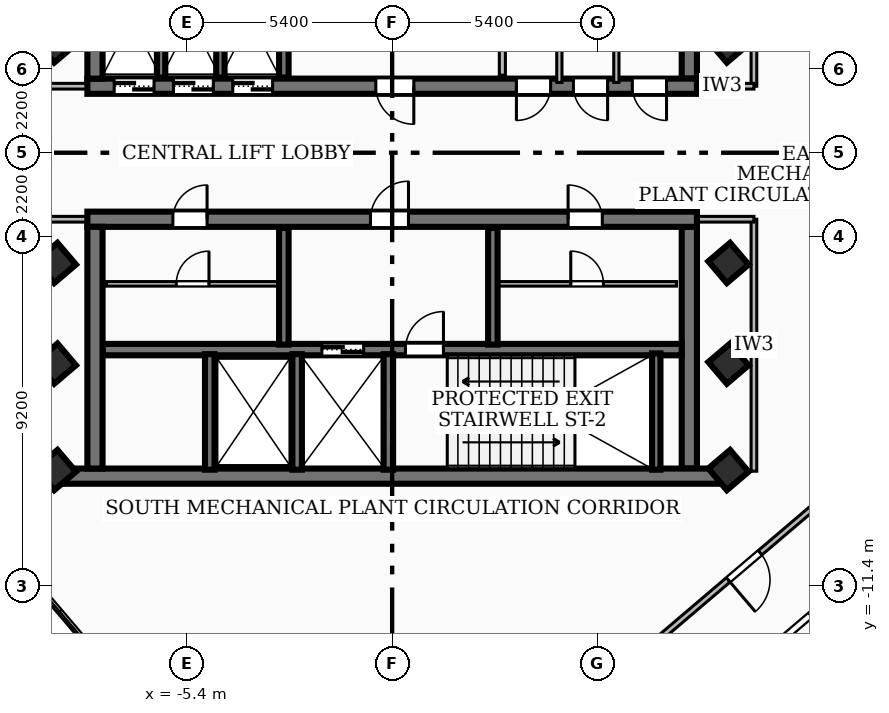
"""IFC4 building model, lengths in metres.
Left out: names, types, materials, properties, quantities, classifications, styles, units other than length and angle.
Written with IfcOpenShell. Run it as: python <this file> out.ifc"""

import sys

from ifc_helpers import new_model, si_unit, direction, frame, frame_2d, origin, origin_2d, place, context, subcontext, project, spatial, rectangle, extrude, element, fill, save


model = new_model("IFC4")
c1 = context("Model", 3, precision=1e-05, world=origin(), true_north=direction((0.0, 1.0)))
c2 = subcontext(c1, "Body", "Model", "MODEL_VIEW")
j1 = project(units=[si_unit("LENGTHUNIT", "METRE"), si_unit("PLANEANGLEUNIT", "RADIAN")], contexts=[c1])
p1 = place(None, origin())
s1 = spatial("IfcSite", under=j1, at=p1, CompositionType="ELEMENT")
p2 = place(p1, origin())
s2 = spatial("IfcBuilding", under=s1, at=p2, CompositionType="ELEMENT")
p3 = place(p2, frame((0.0, 0.0, 239.4)))
s3 = spatial("IfcBuildingStorey", under=s2, at=p3, CompositionType="ELEMENT", Elevation=239.4)
p4 = place(p3, frame((8.02, 1.75, 0.0), z_axis=(0.0, 0.0, 1.0), x_axis=(-1.0, 0.0, 0.0)))
e1 = element("IfcWall", 1, at=p4, inside=s3, PredefinedType="SHEAR", context=c2, shape_type="SweptSolid", body=[
    extrude(rectangle(XDim=16.04, YDim=0.4, at=frame_2d((8.02, 0.0))), origin(), (0.0, 0.0, 1.0), 4.42),
])
p5 = place(p4, frame((7.45, 0.0, 0.0)))
e2 = element("IfcOpeningElement", 2, at=p5, cuts=e1, PredefinedType="OPENING", context=c2, shape_type="SweptSolid", body=[
    extrude(rectangle(XDim=1.0, YDim=2.1, at=frame_2d((0.5, 1.05))), frame((0.0, 0.21, 0.0), z_axis=(0.0, -1.0, 0.0), x_axis=(1.0, 0.0, 0.0)), (0.0, 0.0, 1.0), 0.42),
])
p6 = place(p4, frame((14.285, 0.0, 0.0)))
e3 = element("IfcOpeningElement", 3, at=p6, cuts=e1, PredefinedType="OPENING", context=c2, shape_type="SweptSolid", body=[
    extrude(rectangle(XDim=1.05, YDim=2.15, at=frame_2d((0.525, 1.075))), frame((0.0, 0.21, 0.0), z_axis=(0.0, -1.0, 0.0), x_axis=(1.0, 0.0, 0.0)), (0.0, 0.0, 1.0), 0.42),
])
p7 = place(p4, frame((12.725, 0.0, 0.0)))
e4 = element("IfcOpeningElement", 4, at=p7, cuts=e1, PredefinedType="OPENING", context=c2, shape_type="SweptSolid", body=[
    extrude(rectangle(XDim=1.05, YDim=2.15, at=frame_2d((0.525, 1.075))), frame((0.0, 0.21, 0.0), z_axis=(0.0, -1.0, 0.0), x_axis=(1.0, 0.0, 0.0)), (0.0, 0.0, 1.0), 0.42),
])
p8 = place(p4, frame((11.165, 0.0, 0.0)))
e5 = element("IfcOpeningElement", 5, at=p8, cuts=e1, PredefinedType="OPENING", context=c2, shape_type="SweptSolid", body=[
    extrude(rectangle(XDim=1.05, YDim=2.15, at=frame_2d((0.525, 1.075))), frame((0.0, 0.21, 0.0), z_axis=(0.0, -1.0, 0.0), x_axis=(1.0, 0.0, 0.0)), (0.0, 0.0, 1.0), 0.42),
])
p9 = place(p4, frame((3.85, 0.0, 0.0)))
e6 = element("IfcOpeningElement", 6, at=p9, cuts=e1, PredefinedType="OPENING", context=c2, shape_type="SweptSolid", body=[
    extrude(rectangle(XDim=0.9, YDim=2.06, at=frame_2d((0.45, 1.03))), frame((0.0, 0.21, 0.0), z_axis=(0.0, -1.0, 0.0), x_axis=(1.0, 0.0, 0.0)), (0.0, 0.0, 1.0), 0.42),
])
p10 = place(p4, frame((2.35, 0.0, 0.0)))
e7 = element("IfcOpeningElement", 7, at=p10, cuts=e1, PredefinedType="OPENING", context=c2, shape_type="SweptSolid", body=[
    extrude(rectangle(XDim=0.9, YDim=2.06, at=frame_2d((0.45, 1.03))), frame((0.0, 0.21, 0.0), z_axis=(0.0, -1.0, 0.0), x_axis=(1.0, 0.0, 0.0)), (0.0, 0.0, 1.0), 0.42),
])
p11 = place(p4, frame((0.8, 0.0, 0.0)))
e8 = element("IfcOpeningElement", 8, at=p11, cuts=e1, PredefinedType="OPENING", context=c2, shape_type="SweptSolid", body=[
    extrude(rectangle(XDim=0.9, YDim=2.06, at=frame_2d((0.45, 1.03))), frame((0.0, 0.21, 0.0), z_axis=(0.0, -1.0, 0.0), x_axis=(1.0, 0.0, 0.0)), (0.0, 0.0, 1.0), 0.42),
])
for number, where, z_axis, x_axis in (
    (9, (-7.82, 1.95, 0.0), (0.0, 0.0, 1.0), (0.0, 1.0, 0.0)),
    (10, (7.82, 8.31, 0.0), (0.0, 0.0, 1.0), (0.0, -1.0, 0.0)),
):
    element("IfcWall", number, at=place(p3, frame(where, z_axis=z_axis, x_axis=x_axis)), inside=s3, PredefinedType="SHEAR", context=c2, shape_type="SweptSolid", body=[
        extrude(rectangle(XDim=6.36, YDim=0.4, at=frame_2d((3.18, 0.0))), origin(), (0.0, 0.0, 1.0), 4.42),
    ])
p12 = place(p3, frame((8.78, -8.51, 0.0), z_axis=(0.0, 0.0, 1.0), x_axis=(-1.0, 0.0, 0.0)))
e11 = element("IfcWall", 11, at=p12, inside=s3, PredefinedType="SHEAR", context=c2, shape_type="SweptSolid", body=[
    extrude(rectangle(XDim=17.56, YDim=0.4, at=frame_2d((8.78, 0.0))), origin(), (0.0, 0.0, 1.0), 4.42),
])
p13 = place(p3, frame((-8.02, -1.75, 0.0), z_axis=(0.0, 0.0, 1.0), x_axis=(1.0, 0.0, 0.0)))
e12 = element("IfcWall", 12, at=p13, inside=s3, PredefinedType="SHEAR", context=c2, shape_type="SweptSolid", body=[
    extrude(rectangle(XDim=16.04, YDim=0.4, at=frame_2d((8.02, 0.0))), origin(), (0.0, 0.0, 1.0), 4.42),
])
p14 = place(p13, frame((7.45, 0.0, 0.0)))
e13 = element("IfcOpeningElement", 13, at=p14, cuts=e12, PredefinedType="OPENING", context=c2, shape_type="SweptSolid", body=[
    extrude(rectangle(XDim=1.0, YDim=2.1, at=frame_2d((0.5, 1.05))), frame((0.0, 0.21, 0.0), z_axis=(0.0, -1.0, 0.0), x_axis=(1.0, 0.0, 0.0)), (0.0, 0.0, 1.0), 0.42),
])
p15 = place(p13, frame((12.65, 0.0, 0.0)))
e14 = element("IfcOpeningElement", 14, at=p15, cuts=e12, PredefinedType="OPENING", context=c2, shape_type="SweptSolid", body=[
    extrude(rectangle(XDim=0.9, YDim=2.06, at=frame_2d((0.45, 1.03))), frame((0.0, 0.21, 0.0), z_axis=(0.0, -1.0, 0.0), x_axis=(1.0, 0.0, 0.0)), (0.0, 0.0, 1.0), 0.42),
])
p16 = place(p13, frame((2.25, 0.0, 0.0)))
e15 = element("IfcOpeningElement", 15, at=p16, cuts=e12, PredefinedType="OPENING", context=c2, shape_type="SweptSolid", body=[
    extrude(rectangle(XDim=0.9, YDim=2.06, at=frame_2d((0.45, 1.03))), frame((0.0, 0.21, 0.0), z_axis=(0.0, -1.0, 0.0), x_axis=(1.0, 0.0, 0.0)), (0.0, 0.0, 1.0), 0.42),
])
for number, where, z_axis, x_axis in (
    (16, (-7.82, -8.31, 0.0), (0.0, 0.0, 1.0), (0.0, 1.0, 0.0)),
    (17, (7.82, -1.95, 0.0), (0.0, 0.0, 1.0), (0.0, -1.0, 0.0)),
):
    element("IfcWall", number, at=place(p3, frame(where, z_axis=z_axis, x_axis=x_axis)), inside=s3, PredefinedType="SHEAR", context=c2, shape_type="SweptSolid", body=[
        extrude(rectangle(XDim=6.36, YDim=0.4, at=frame_2d((3.18, 0.0))), origin(), (0.0, 0.0, 1.0), 4.42),
    ])
p17 = place(p3, frame((-7.62, -5.18, 0.0), z_axis=(0.0, 0.0, 1.0), x_axis=(1.0, 0.0, 0.0)))
e18 = element("IfcWall", 18, at=p17, inside=s3, PredefinedType="SOLIDWALL", context=c2, shape_type="SweptSolid", body=[
    extrude(rectangle(XDim=15.24, YDim=0.3, at=frame_2d((7.62, 0.0))), origin(), (0.0, 0.0, 1.0), 4.42),
])
p18 = place(p17, frame((5.77, 0.0, 0.0)))
e19 = element("IfcOpeningElement", 19, at=p18, cuts=e18, PredefinedType="OPENING", context=c2, shape_type="SweptSolid", body=[
    extrude(rectangle(XDim=1.1, YDim=2.15, at=frame_2d((0.55, 1.075))), frame((0.0, 0.16, 0.0), z_axis=(0.0, -1.0, 0.0), x_axis=(1.0, 0.0, 0.0)), (0.0, 0.0, 1.0), 0.32),
])
p19 = place(p17, frame((7.97, 0.0, 0.0)))
e20 = element("IfcOpeningElement", 20, at=p19, cuts=e18, PredefinedType="OPENING", context=c2, shape_type="SweptSolid", body=[
    extrude(rectangle(XDim=1.0, YDim=2.1, at=frame_2d((0.5, 1.05))), frame((0.0, 0.16, 0.0), z_axis=(0.0, -1.0, 0.0), x_axis=(1.0, 0.0, 0.0)), (0.0, 0.0, 1.0), 0.32),
])
p20 = place(p3, frame((6.95, -8.34, 0.0), z_axis=(0.0, 0.0, 1.0), x_axis=(0.0, 1.0, 0.0)))
e21 = element("IfcWall", 21, at=p20, inside=s3, PredefinedType="SOLIDWALL", context=c2, shape_type="SweptSolid", body=[
    extrude(rectangle(XDim=3.06, YDim=0.22, at=frame_2d((1.53, 0.0))), origin(), (0.0, 0.0, 1.0), 4.42),
])
p21 = place(p3, frame((-2.85, 1.98, 0.0), z_axis=(0.0, 0.0, 1.0), x_axis=(0.0, 1.0, 0.0)))
e22 = element("IfcWall", 22, at=p21, inside=s3, PredefinedType="SOLIDWALL", context=c2, shape_type="SweptSolid", body=[
    extrude(rectangle(XDim=3.07, YDim=0.25, at=frame_2d((1.535, 0.0))), origin(), (0.0, 0.0, 1.0), 4.42),
])
for number, where, z_axis, x_axis in (
    (23, (-0.1, -8.34, 0.0), (0.0, 0.0, 1.0), (0.0, 1.0, 0.0)),
    (24, (-2.5, -8.34, 0.0), (0.0, 0.0, 1.0), (0.0, 1.0, 0.0)),
    (25, (-4.8, -8.34, 0.0), (0.0, 0.0, 1.0), (0.0, 1.0, 0.0)),
):
    element("IfcWall", number, at=place(p3, frame(where, z_axis=z_axis, x_axis=x_axis)), inside=s3, PredefinedType="SOLIDWALL", context=c2, shape_type="SweptSolid", body=[
        extrude(rectangle(XDim=3.04, YDim=0.25, at=frame_2d((1.52, 0.0))), origin(), (0.0, 0.0, 1.0), 4.42),
    ])
for number, where, z_axis, x_axis in (
    (26, (-2.85, -5.05, 0.0), (0.0, 0.0, 1.0), (0.0, 1.0, 0.0)),
    (27, (2.65, -5.05, 0.0), (0.0, 0.0, 1.0), (0.0, 1.0, 0.0)),
):
    element("IfcWall", number, at=place(p3, frame(where, z_axis=z_axis, x_axis=x_axis)), inside=s3, PredefinedType="SOLIDWALL", context=c2, shape_type="SweptSolid", body=[
        extrude(rectangle(XDim=3.07, YDim=0.25, at=frame_2d((1.535, 0.0))), origin(), (0.0, 0.0, 1.0), 4.42),
    ])
for number, where, z_axis, x_axis in (
    (28, (-6.08, 1.98, 0.0), (0.0, 0.0, 1.0), (0.0, 1.0, 0.0)),
    (29, (-4.52, 1.98, 0.0), (0.0, 0.0, 1.0), (0.0, 1.0, 0.0)),
):
    element("IfcWall", number, at=place(p3, frame(where, z_axis=z_axis, x_axis=x_axis)), inside=s3, PredefinedType="SOLIDWALL", context=c2, shape_type="SweptSolid", body=[
        extrude(rectangle(XDim=3.07, YDim=0.22, at=frame_2d((1.535, 0.0))), origin(), (0.0, 0.0, 1.0), 4.42),
    ])
for number, where, z_axis, x_axis in (
    (30, (-8.85, -5.55, 0.0), (0.0, 0.0, 1.0), (0.762, 0.648, 0.0)),
    (31, (-8.85, -2.9, 0.0), (0.0, 0.0, 1.0), (0.762, 0.648, 0.0)),
    (32, (-8.85, 2.9, 0.0), (0.0, 0.0, 1.0), (0.762, 0.648, 0.0)),
    (33, (8.85, -5.55, 0.0), (0.0, 0.0, 1.0), (0.762, 0.648, 0.0)),
    (34, (8.85, -2.9, 0.0), (0.0, 0.0, 1.0), (0.762, 0.648, 0.0)),
    (35, (8.85, 2.9, 0.0), (0.0, 0.0, 1.0), (0.762, 0.648, 0.0)),
    (36, (8.85, -8.35, 0.0), (0.0, 0.0, 1.0), (0.762, 0.648, 0.0)),
    (37, (-8.85, -8.35, 0.0), (0.0, 0.0, 1.0), (0.762, 0.648, 0.0)),
):
    element("IfcColumn", number, at=place(p3, frame(where, z_axis=z_axis, x_axis=x_axis)), inside=s3, PredefinedType="COLUMN", context=c2, shape_type="SweptSolid", body=[
        extrude(rectangle(XDim=0.75, YDim=0.75, at=origin_2d()), origin(), (0.0, 0.0, 1.0), 4.68),
    ])
p22 = place(p3, frame((16.951, -12.493, 0.0), z_axis=(0.0, 0.0, 1.0), x_axis=(-0.761554435907, -0.648100949814, 0.0)))
e38 = element("IfcWall", 38, at=p22, inside=s3, PredefinedType="SOLIDWALL", context=c2, shape_type="SweptSolid", body=[
    extrude(rectangle(XDim=10.224, YDim=0.2, at=frame_2d((5.112, 0.0))), origin(), (0.0, 0.0, 1.0), 4.42),
])
p23 = place(p3, frame((2.9, 2.04, 0.0), z_axis=(0.0, 0.0, 1.0), x_axis=(0.0, 1.0, 0.0)))
e39 = element("IfcWall", 39, at=p23, inside=s3, PredefinedType="PARTITIONING", context=c2, shape_type="SweptSolid", body=[
    extrude(rectangle(XDim=2.94, YDim=0.16, at=frame_2d((1.47, 0.0))), origin(), (0.0, 0.0, 1.0), 3.65),
])
p24 = place(p23, frame((1.82, 0.0, 0.0)))
e40 = element("IfcOpeningElement", 40, at=p24, cuts=e39, PredefinedType="OPENING", context=c2, shape_type="SweptSolid", body=[
    extrude(rectangle(XDim=0.9, YDim=2.06, at=frame_2d((0.45, 1.03))), frame((0.0, 0.09, 0.0), z_axis=(0.0, -1.0, 0.0), x_axis=(1.0, 0.0, 0.0)), (0.0, 0.0, 1.0), 0.18),
])
p25 = place(p3, frame((2.8, -3.45, 0.0), z_axis=(0.0, 0.0, 1.0), x_axis=(1.0, 0.0, 0.0)))
e41 = element("IfcWall", 41, at=p25, inside=s3, PredefinedType="PARTITIONING", context=c2, shape_type="SweptSolid", body=[
    extrude(rectangle(XDim=4.68, YDim=0.12, at=frame_2d((2.34, 0.0))), origin(), (0.0, 0.0, 1.0), 4.42),
])
p26 = place(p25, frame((1.9, 0.0, 0.0)))
e42 = element("IfcOpeningElement", 42, at=p26, cuts=e41, PredefinedType="OPENING", context=c2, shape_type="SweptSolid", body=[
    extrude(rectangle(XDim=0.86, YDim=2.04, at=frame_2d((0.43, 1.02))), frame((0.0, 0.07, 0.0), z_axis=(0.0, -1.0, 0.0), x_axis=(1.0, 0.0, 0.0)), (0.0, 0.0, 1.0), 0.14),
])
p27 = place(p3, frame((-7.52, -3.45, 0.0), z_axis=(0.0, 0.0, 1.0), x_axis=(1.0, 0.0, 0.0)))
e43 = element("IfcWall", 43, at=p27, inside=s3, PredefinedType="PARTITIONING", context=c2, shape_type="SweptSolid", body=[
    extrude(rectangle(XDim=4.54, YDim=0.12, at=frame_2d((2.27, 0.0))), origin(), (0.0, 0.0, 1.0), 4.42),
])
p28 = place(p27, frame((1.84, 0.0, 0.0)))
e44 = element("IfcOpeningElement", 44, at=p28, cuts=e43, PredefinedType="OPENING", context=c2, shape_type="SweptSolid", body=[
    extrude(rectangle(XDim=0.86, YDim=2.04, at=frame_2d((0.43, 1.02))), frame((0.0, 0.07, 0.0), z_axis=(0.0, -1.0, 0.0), x_axis=(1.0, 0.0, 0.0)), (0.0, 0.0, 1.0), 0.14),
])
for number, where, z_axis, x_axis in (
    (45, (4.4, 1.85, 0.0), (0.0, 0.0, 1.0), (0.0, 1.0, 0.0)),
    (46, (5.9, 1.85, 0.0), (0.0, 0.0, 1.0), (0.0, 1.0, 0.0)),
):
    element("IfcWall", number, at=place(p3, frame(where, z_axis=z_axis, x_axis=x_axis)), inside=s3, PredefinedType="PARTITIONING", context=c2, shape_type="SweptSolid", body=[
        extrude(rectangle(XDim=1.89, YDim=0.138, at=frame_2d((0.945, 0.0))), origin(), (0.0, 0.0, 1.0), 3.65),
    ])
for number, where, z_axis, x_axis in (
    (47, (-7.85, 1.75, 0.0), (0.0, 0.0, 1.0), (-1.0, 0.0, 0.0)),
    (48, (-7.85, -1.75, 0.0), (0.0, 0.0, 1.0), (-1.0, 0.0, 0.0)),
):
    element("IfcWall", number, at=place(p3, frame(where, z_axis=z_axis, x_axis=x_axis)), inside=s3, PredefinedType="PARTITIONING", context=c2, shape_type="SweptSolid", body=[
        extrude(rectangle(XDim=1.67, YDim=0.15, at=frame_2d((0.835, 0.0))), origin(), (0.0, 0.0, 1.0), 3.65),
    ])
p29 = place(p3, frame((9.52, 1.75, 0.0), z_axis=(0.0, 0.0, 1.0), x_axis=(0.0, 1.0, 0.0)))
e49 = element("IfcWall", 49, at=p29, inside=s3, PredefinedType="PARTITIONING", context=c2, shape_type="SweptSolid", body=[
    extrude(rectangle(XDim=6.63, YDim=0.15, at=frame_2d((3.315, 0.0))), origin(), (0.0, 0.0, 1.0), 2.212),
])
p30 = place(p3, frame((7.85, 1.75, 0.0), z_axis=(0.0, 0.0, 1.0), x_axis=(1.0, 0.0, 0.0)))
e50 = element("IfcWall", 50, at=p30, inside=s3, PredefinedType="PARTITIONING", context=c2, shape_type="SweptSolid", body=[
    extrude(rectangle(XDim=1.67, YDim=0.15, at=frame_2d((0.835, 0.0))), origin(), (0.0, 0.0, 1.0), 3.65),
])
p31 = place(p3, frame((9.52, -8.38, 0.0), z_axis=(0.0, 0.0, 1.0), x_axis=(0.0, 1.0, 0.0)))
e51 = element("IfcWall", 51, at=p31, inside=s3, PredefinedType="PARTITIONING", context=c2, shape_type="SweptSolid", body=[
    extrude(rectangle(XDim=6.63, YDim=0.15, at=frame_2d((3.315, 0.0))), origin(), (0.0, 0.0, 1.0), 2.212),
])
p32 = place(p3, frame((7.85, -1.75, 0.0), z_axis=(0.0, 0.0, 1.0), x_axis=(1.0, 0.0, 0.0)))
e52 = element("IfcWall", 52, at=p32, inside=s3, PredefinedType="PARTITIONING", context=c2, shape_type="SweptSolid", body=[
    extrude(rectangle(XDim=1.67, YDim=0.15, at=frame_2d((0.835, 0.0))), origin(), (0.0, 0.0, 1.0), 3.65),
])
p33 = place(p3, frame((4.045, 17.296, 0.0), z_axis=(0.0, 0.0, 1.0), x_axis=(0.648103934292, -0.761551896035, 0.0)))
e53 = element("IfcWall", 53, at=p33, inside=s3, PredefinedType="PARTITIONING", context=c2, shape_type="SweptSolid", body=[
    extrude(rectangle(XDim=20.5, YDim=0.15, at=frame_2d((10.25, 0.0))), origin(), (0.0, 0.0, 1.0), 2.212),
])
p34 = place(p33, frame((13.799, 0.0, 0.0)))
e54 = element("IfcOpeningElement", 54, at=p34, cuts=e53, PredefinedType="OPENING", context=c2, shape_type="SweptSolid", body=[
    extrude(rectangle(XDim=1.1, YDim=2.15, at=frame_2d((0.55, 1.075))), frame((0.0, 0.085, 0.0), z_axis=(0.0, -1.0, 0.0), x_axis=(1.0, 0.0, 0.0)), (0.0, 0.0, 1.0), 0.17),
])
p35 = place(p3, frame((17.296, -4.045, 0.0), z_axis=(0.0, 0.0, 1.0), x_axis=(-0.761551896035, -0.648103934292, 0.0)))
e55 = element("IfcWall", 55, at=p35, inside=s3, PredefinedType="PARTITIONING", context=c2, shape_type="SweptSolid", body=[
    extrude(rectangle(XDim=20.5, YDim=0.15, at=frame_2d((10.25, 0.0))), origin(), (0.0, 0.0, 1.0), 2.212),
])
p36 = place(p35, frame((9.999, 0.0, 0.0)))
e56 = element("IfcOpeningElement", 56, at=p36, cuts=e55, PredefinedType="OPENING", context=c2, shape_type="SweptSolid", body=[
    extrude(rectangle(XDim=1.1, YDim=2.15, at=frame_2d((0.55, 1.075))), frame((0.0, 0.085, 0.0), z_axis=(0.0, -1.0, 0.0), x_axis=(1.0, 0.0, 0.0)), (0.0, 0.0, 1.0), 0.17),
])
p37 = place(p3, frame((15.378, -8.449, 0.0), z_axis=(0.0, 0.0, 1.0), x_axis=(-0.761592155386, -0.648056624729, 0.0)))
e57 = element("IfcWall", 57, at=p37, inside=s3, PredefinedType="PARTITIONING", context=c2, shape_type="SweptSolid", body=[
    extrude(rectangle(XDim=13.07, YDim=0.15, at=frame_2d((6.535, 0.0))), origin(), (0.0, 0.0, 1.0), 2.212),
])
p38 = place(p37, frame((5.735, 0.0, 0.0)))
e58 = element("IfcOpeningElement", 58, at=p38, cuts=e57, PredefinedType="OPENING", context=c2, shape_type="SweptSolid", body=[
    extrude(rectangle(XDim=1.0, YDim=2.1, at=frame_2d((0.5, 1.05))), frame((0.0, 0.085, 0.0), z_axis=(0.0, -1.0, 0.0), x_axis=(1.0, 0.0, 0.0)), (0.0, 0.0, 1.0), 0.17),
])
p39 = place(p5, origin())
e59 = element("IfcDoor", 59, at=p39, inside=s3, OperationType="SINGLE_SWING_LEFT", PredefinedType="DOOR", context=c2, shape_type="SweptSolid", body=[
    extrude(rectangle(XDim=1.0, YDim=2.1, at=frame_2d((0.5, 1.05))), frame((0.0, 0.025, 0.0), z_axis=(0.0, -1.0, 0.0), x_axis=(1.0, 0.0, 0.0)), (0.0, 0.0, 1.0), 0.05),
])
fill(e2, e59)
p40 = place(p14, origin())
e60 = element("IfcDoor", 60, at=p40, inside=s3, OperationType="SINGLE_SWING_RIGHT", PredefinedType="DOOR", context=c2, shape_type="SweptSolid", body=[
    extrude(rectangle(XDim=1.0, YDim=2.1, at=frame_2d((0.5, 1.05))), frame((0.0, 0.025, 0.0), z_axis=(0.0, -1.0, 0.0), x_axis=(1.0, 0.0, 0.0)), (0.0, 0.0, 1.0), 0.05),
])
fill(e13, e60)
p41 = place(p18, origin())
e61 = element("IfcDoor", 61, at=p41, inside=s3, OperationType="DOUBLE_DOOR_SLIDING", PredefinedType="DOOR", context=c2, shape_type="SweptSolid", body=[
    extrude(rectangle(XDim=1.1, YDim=2.15, at=frame_2d((0.55, 1.075))), frame((0.0, 0.025, 0.0), z_axis=(0.0, -1.0, 0.0), x_axis=(1.0, 0.0, 0.0)), (0.0, 0.0, 1.0), 0.05),
])
fill(e19, e61)
p42 = place(p19, origin())
e62 = element("IfcDoor", 62, at=p42, inside=s3, OperationType="SINGLE_SWING_RIGHT", PredefinedType="DOOR", context=c2, shape_type="SweptSolid", body=[
    extrude(rectangle(XDim=1.0, YDim=2.1, at=frame_2d((0.5, 1.05))), frame((0.0, 0.025, 0.0), z_axis=(0.0, -1.0, 0.0), x_axis=(1.0, 0.0, 0.0)), (0.0, 0.0, 1.0), 0.05),
])
fill(e20, e62)
p43 = place(p6, origin())
e63 = element("IfcDoor", 63, at=p43, inside=s3, OperationType="DOUBLE_DOOR_SLIDING", PredefinedType="DOOR", context=c2, shape_type="SweptSolid", body=[
    extrude(rectangle(XDim=1.05, YDim=2.15, at=frame_2d((0.525, 1.075))), frame((0.0, 0.025, 0.0), z_axis=(0.0, -1.0, 0.0), x_axis=(1.0, 0.0, 0.0)), (0.0, 0.0, 1.0), 0.05),
])
fill(e3, e63)
p44 = place(p7, origin())
e64 = element("IfcDoor", 64, at=p44, inside=s3, OperationType="DOUBLE_DOOR_SLIDING", PredefinedType="DOOR", context=c2, shape_type="SweptSolid", body=[
    extrude(rectangle(XDim=1.05, YDim=2.15, at=frame_2d((0.525, 1.075))), frame((0.0, 0.025, 0.0), z_axis=(0.0, -1.0, 0.0), x_axis=(1.0, 0.0, 0.0)), (0.0, 0.0, 1.0), 0.05),
])
fill(e4, e64)
p45 = place(p8, origin())
e65 = element("IfcDoor", 65, at=p45, inside=s3, OperationType="DOUBLE_DOOR_SLIDING", PredefinedType="DOOR", context=c2, shape_type="SweptSolid", body=[
    extrude(rectangle(XDim=1.05, YDim=2.15, at=frame_2d((0.525, 1.075))), frame((0.0, 0.025, 0.0), z_axis=(0.0, -1.0, 0.0), x_axis=(1.0, 0.0, 0.0)), (0.0, 0.0, 1.0), 0.05),
])
fill(e5, e65)
p46 = place(p15, origin())
e66 = element("IfcDoor", 66, at=p46, inside=s3, OperationType="SINGLE_SWING_LEFT", PredefinedType="DOOR", context=c2, shape_type="SweptSolid", body=[
    extrude(rectangle(XDim=0.9, YDim=2.06, at=frame_2d((0.45, 1.03))), frame((0.0, 0.025, 0.0), z_axis=(0.0, -1.0, 0.0), x_axis=(1.0, 0.0, 0.0)), (0.0, 0.0, 1.0), 0.05),
])
fill(e14, e66)
p47 = place(p16, origin())
e67 = element("IfcDoor", 67, at=p47, inside=s3, OperationType="SINGLE_SWING_RIGHT", PredefinedType="DOOR", context=c2, shape_type="SweptSolid", body=[
    extrude(rectangle(XDim=0.9, YDim=2.06, at=frame_2d((0.45, 1.03))), frame((0.0, 0.025, 0.0), z_axis=(0.0, -1.0, 0.0), x_axis=(1.0, 0.0, 0.0)), (0.0, 0.0, 1.0), 0.05),
])
fill(e15, e67)
p48 = place(p9, origin())
e68 = element("IfcDoor", 68, at=p48, inside=s3, OperationType="SINGLE_SWING_RIGHT", PredefinedType="DOOR", context=c2, shape_type="SweptSolid", body=[
    extrude(rectangle(XDim=0.9, YDim=2.06, at=frame_2d((0.45, 1.03))), frame((0.0, 0.025, 0.0), z_axis=(0.0, -1.0, 0.0), x_axis=(1.0, 0.0, 0.0)), (0.0, 0.0, 1.0), 0.05),
])
fill(e6, e68)
p49 = place(p10, origin())
e69 = element("IfcDoor", 69, at=p49, inside=s3, OperationType="SINGLE_SWING_LEFT", PredefinedType="DOOR", context=c2, shape_type="SweptSolid", body=[
    extrude(rectangle(XDim=0.9, YDim=2.06, at=frame_2d((0.45, 1.03))), frame((0.0, 0.025, 0.0), z_axis=(0.0, -1.0, 0.0), x_axis=(1.0, 0.0, 0.0)), (0.0, 0.0, 1.0), 0.05),
])
fill(e7, e69)
p50 = place(p11, origin())
e70 = element("IfcDoor", 70, at=p50, inside=s3, OperationType="SINGLE_SWING_LEFT", PredefinedType="DOOR", context=c2, shape_type="SweptSolid", body=[
    extrude(rectangle(XDim=0.9, YDim=2.06, at=frame_2d((0.45, 1.03))), frame((0.0, 0.025, 0.0), z_axis=(0.0, -1.0, 0.0), x_axis=(1.0, 0.0, 0.0)), (0.0, 0.0, 1.0), 0.05),
])
fill(e8, e70)
p51 = place(p26, origin())
e71 = element("IfcDoor", 71, at=p51, inside=s3, OperationType="SINGLE_SWING_LEFT", PredefinedType="DOOR", context=c2, shape_type="SweptSolid", body=[
    extrude(rectangle(XDim=0.86, YDim=2.04, at=frame_2d((0.43, 1.02))), frame((0.0, 0.025, 0.0), z_axis=(0.0, -1.0, 0.0), x_axis=(1.0, 0.0, 0.0)), (0.0, 0.0, 1.0), 0.05),
])
fill(e42, e71)
p52 = place(p28, origin())
e72 = element("IfcDoor", 72, at=p52, inside=s3, OperationType="SINGLE_SWING_RIGHT", PredefinedType="DOOR", context=c2, shape_type="SweptSolid", body=[
    extrude(rectangle(XDim=0.86, YDim=2.04, at=frame_2d((0.43, 1.02))), frame((0.0, 0.025, 0.0), z_axis=(0.0, -1.0, 0.0), x_axis=(1.0, 0.0, 0.0)), (0.0, 0.0, 1.0), 0.05),
])
fill(e44, e72)
p53 = place(p36, origin())
e73 = element("IfcDoor", 73, at=p53, inside=s3, OperationType="SINGLE_SWING_RIGHT", PredefinedType="DOOR", context=c2, shape_type="SweptSolid", body=[
    extrude(rectangle(XDim=1.1, YDim=2.15, at=frame_2d((0.55, 1.075))), frame((0.0, 0.025, 0.0), z_axis=(0.0, -1.0, 0.0), x_axis=(1.0, 0.0, 0.0)), (0.0, 0.0, 1.0), 0.05),
])
fill(e56, e73)
p54 = place(p38, origin())
e74 = element("IfcDoor", 74, at=p54, inside=s3, OperationType="SINGLE_SWING_RIGHT", PredefinedType="DOOR", context=c2, shape_type="SweptSolid", body=[
    extrude(rectangle(XDim=1.0, YDim=2.1, at=frame_2d((0.5, 1.05))), frame((0.0, 0.025, 0.0), z_axis=(0.0, -1.0, 0.0), x_axis=(1.0, 0.0, 0.0)), (0.0, 0.0, 1.0), 0.05),
])
fill(e58, e74)
save(model, sys.argv[1])
